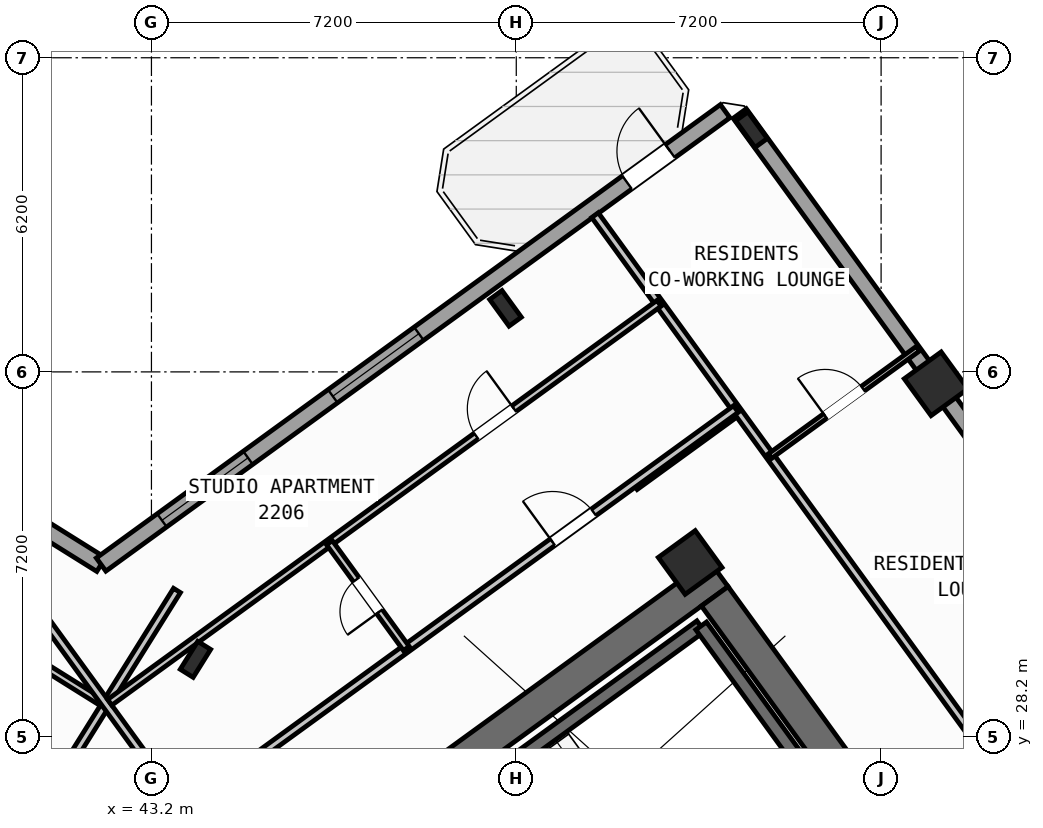
"""IFC4 building model, lengths in metres.
Left out: names, types, materials, properties, quantities, classifications, styles, units other than length and angle.
Written with IfcOpenShell. Run it as: python <this file> out.ifc"""

import sys

from ifc_helpers import new_model, si_unit, direction, frame, frame_2d, origin, origin_2d, place, context, subcontext, project, spatial, rectangle, hollow_rectangle, i_section, extrude, source, transform, mapped, element, fill, save


model = new_model("IFC4")
c1 = context("Model", 3, precision=1e-05, world=origin(), true_north=direction((0.0, 1.0)))
c2 = subcontext(c1, "Body", "Model", "MODEL_VIEW")
j1 = project(units=[si_unit("LENGTHUNIT", "METRE"), si_unit("PLANEANGLEUNIT", "RADIAN")], contexts=[c1])
p1 = place(None, origin())
s1 = spatial("IfcSite", under=j1, at=p1, CompositionType="ELEMENT")
p2 = place(p1, origin())
s2 = spatial("IfcBuilding", under=s1, at=p2, CompositionType="ELEMENT")
p3 = place(p2, frame((0.0, 0.0, 90.0)))
s3 = spatial("IfcBuildingStorey", under=s2, at=p3, CompositionType="ELEMENT", Elevation=90.0)
p4 = place(p3, frame((44.325, 24.113, 0.0), z_axis=(0.0, 0.0, 1.0), x_axis=(0.809012664862, 0.58779121131, 0.0)))
e1 = element("IfcWall", 1, at=p4, inside=s3, PredefinedType="SHEAR", context=c2, shape_type="SweptSolid", body=[
    extrude(rectangle(XDim=12.44, YDim=0.65, at=frame_2d((6.22, 0.0))), origin(), (0.0, 0.0, 1.0), 3.35),
])
p5 = place(p3, frame((58.064, 25.813, 0.0), z_axis=(0.0, 0.0, 1.0), x_axis=(-0.58777996584, 0.809020835181, 0.0)))
e2 = element("IfcWall", 2, at=p5, inside=s3, PredefinedType="SHEAR", context=c2, shape_type="SweptSolid", body=[
    extrude(rectangle(XDim=6.375, YDim=0.65, at=frame_2d((3.188, 0.0))), origin(), (0.0, 0.0, 1.0), 3.35),
])
m1 = source(origin(), c2, "Body", "SweptSolid", [
    extrude(i_section(OverallWidth=0.3, OverallDepth=0.65, WebThickness=0.016, FlangeThickness=0.031, at=origin_2d()), origin(), (0.0, 0.0, 1.0), 3.6),
])
p6 = place(p3, frame((44.068, 29.726, 0.0), z_axis=(0.0, 0.0, 1.0), x_axis=(-0.848048096156, 0.529919264233, 0.0)))
e3 = element("IfcColumn", 3, at=p6, inside=s3, PredefinedType="COLUMN", context=c2, shape_type="MappedRepresentation", body=[
    mapped(m1, transform((0.0, 0.0, 0.0), scale=1.0)),
])
m2 = source(origin(), c2, "Body", "SweptSolid", [
    extrude(hollow_rectangle(XDim=0.9, YDim=0.9, WallThickness=0.036, at=origin_2d()), origin(), (0.0, 0.0, 1.0), 3.6),
])
p7 = place(p3, frame((53.832, 31.638, 0.0), z_axis=(0.0, 0.0, 1.0), x_axis=(0.809016994375, 0.587785252292, 0.0)))
e4 = element("IfcColumn", 4, at=p7, inside=s3, PredefinedType="COLUMN", context=c2, shape_type="MappedRepresentation", body=[
    mapped(m2, transform((0.0, 0.0, 0.0), scale=1.0)),
])
p8 = place(p3, frame((50.188, 36.654, 0.0), z_axis=(0.0, 0.0, 1.0), x_axis=(0.809016994375, 0.587785252292, 0.0)))
e5 = element("IfcColumn", 5, at=p8, inside=s3, PredefinedType="COLUMN", context=c2, shape_type="MappedRepresentation", body=[
    mapped(m1, transform((0.0, 0.0, 0.0), scale=1.0)),
])
p9 = place(p3, frame((58.686, 35.165, 0.0), z_axis=(0.0, 0.0, 1.0), x_axis=(0.809016994375, 0.587785252292, 0.0)))
e6 = element("IfcColumn", 6, at=p9, inside=s3, PredefinedType="COLUMN", context=c2, shape_type="MappedRepresentation", body=[
    mapped(m2, transform((0.0, 0.0, 0.0), scale=1.0)),
])
p10 = place(p3, frame((55.042, 40.181, 0.0), z_axis=(0.0, 0.0, 1.0), x_axis=(0.809016994375, 0.587785252292, 0.0)))
e7 = element("IfcColumn", 7, at=p10, inside=s3, PredefinedType="COLUMN", context=c2, shape_type="MappedRepresentation", body=[
    mapped(m1, transform((0.0, 0.0, 0.0), scale=1.0)),
])
p11 = place(p3, frame((17.424, 47.083, 0.0), z_axis=(0.0, 0.0, 1.0), x_axis=(0.848049927979, -0.529916332693, 0.0)))
e8 = element("IfcWall", 8, at=p11, inside=s3, PredefinedType="STANDARD", context=c2, shape_type="SweptSolid", body=[
    extrude(rectangle(XDim=29.223, YDim=0.32, at=frame_2d((14.612, 0.0))), origin(), (0.0, 0.0, 1.0), 3.35),
])
p12 = place(p11, frame((15.02, 0.0, 0.0)))
e9 = element("IfcOpeningElement", 9, at=p12, cuts=e8, PredefinedType="OPENING", context=c2, shape_type="SweptSolid", body=[
    extrude(rectangle(XDim=1.05, YDim=2.15, at=frame_2d((0.525, 1.075))), frame((0.0, 0.17, 0.0), z_axis=(0.0, -1.0, 0.0), x_axis=(1.0, 0.0, 0.0)), (0.0, 0.0, 1.0), 0.34),
])
p13 = place(p11, frame((20.869, 0.0, 0.8)))
e10 = element("IfcOpeningElement", 10, at=p13, cuts=e8, PredefinedType="OPENING", context=c2, shape_type="SweptSolid", body=[
    extrude(rectangle(XDim=2.1, YDim=1.55, at=frame_2d((1.05, 0.775))), frame((0.0, 0.17, 0.0), z_axis=(0.0, -1.0, 0.0), x_axis=(1.0, 0.0, 0.0)), (0.0, 0.0, 1.0), 0.34),
])
p14 = place(p11, frame((25.438, 0.0, 0.8)))
e11 = element("IfcOpeningElement", 11, at=p14, cuts=e8, PredefinedType="OPENING", context=c2, shape_type="SweptSolid", body=[
    extrude(rectangle(XDim=2.1, YDim=1.55, at=frame_2d((1.05, 0.775))), frame((0.0, 0.17, 0.0), z_axis=(0.0, -1.0, 0.0), x_axis=(1.0, 0.0, 0.0)), (0.0, 0.0, 1.0), 0.34),
])
p15 = place(p11, frame((10.481, 0.0, 1.0)))
e12 = element("IfcOpeningElement", 12, at=p15, cuts=e8, PredefinedType="OPENING", context=c2, shape_type="SweptSolid", body=[
    extrude(rectangle(XDim=0.9, YDim=1.25, at=frame_2d((0.45, 0.625))), frame((0.0, 0.17, 0.0), z_axis=(0.0, -1.0, 0.0), x_axis=(1.0, 0.0, 0.0)), (0.0, 0.0, 1.0), 0.34),
])
p16 = place(p11, frame((6.674, 0.0, 1.0)))
e13 = element("IfcOpeningElement", 13, at=p16, cuts=e8, PredefinedType="OPENING", context=c2, shape_type="SweptSolid", body=[
    extrude(rectangle(XDim=0.9, YDim=1.25, at=frame_2d((0.45, 0.625))), frame((0.0, 0.17, 0.0), z_axis=(0.0, -1.0, 0.0), x_axis=(1.0, 0.0, 0.0)), (0.0, 0.0, 1.0), 0.34),
])
p17 = place(p11, frame((3.694, 0.0, 1.0)))
e14 = element("IfcOpeningElement", 14, at=p17, cuts=e8, PredefinedType="OPENING", context=c2, shape_type="SweptSolid", body=[
    extrude(rectangle(XDim=0.9, YDim=1.25, at=frame_2d((0.45, 0.625))), frame((0.0, 0.17, 0.0), z_axis=(0.0, -1.0, 0.0), x_axis=(1.0, 0.0, 0.0)), (0.0, 0.0, 1.0), 0.34),
])
p18 = place(p3, frame((42.207, 31.597, 0.0), z_axis=(0.0, 0.0, 1.0), x_axis=(0.809020333377, 0.587780656523, 0.0)))
e15 = element("IfcWall", 15, at=p18, inside=s3, PredefinedType="STANDARD", context=c2, shape_type="SweptSolid", body=[
    extrude(rectangle(XDim=15.223, YDim=0.32, at=frame_2d((7.611, 0.0))), origin(), (0.0, 0.0, 1.0), 3.35),
])
p19 = place(p18, frame((12.831, 0.0, 0.0)))
e16 = element("IfcOpeningElement", 16, at=p19, cuts=e15, PredefinedType="OPENING", context=c2, shape_type="SweptSolid", body=[
    extrude(rectangle(XDim=1.05, YDim=2.15, at=frame_2d((0.525, 1.075))), frame((0.0, 0.17, 0.0), z_axis=(0.0, -1.0, 0.0), x_axis=(1.0, 0.0, 0.0)), (0.0, 0.0, 1.0), 0.34),
])
p20 = place(p18, frame((1.484, 0.0, 0.8)))
e17 = element("IfcOpeningElement", 17, at=p20, cuts=e15, PredefinedType="OPENING", context=c2, shape_type="SweptSolid", body=[
    extrude(rectangle(XDim=2.1, YDim=1.55, at=frame_2d((1.05, 0.775))), frame((0.0, 0.17, 0.0), z_axis=(0.0, -1.0, 0.0), x_axis=(1.0, 0.0, 0.0)), (0.0, 0.0, 1.0), 0.34),
])
p21 = place(p18, frame((5.652, 0.0, 0.8)))
e18 = element("IfcOpeningElement", 18, at=p21, cuts=e15, PredefinedType="OPENING", context=c2, shape_type="SweptSolid", body=[
    extrude(rectangle(XDim=2.1, YDim=1.55, at=frame_2d((1.05, 0.775))), frame((0.0, 0.17, 0.0), z_axis=(0.0, -1.0, 0.0), x_axis=(1.0, 0.0, 0.0)), (0.0, 0.0, 1.0), 0.34),
])
p22 = place(p3, frame((54.81, 40.5, 0.0), z_axis=(0.0, 0.0, 1.0), x_axis=(0.587783625747, -0.809018176127, 0.0)))
e19 = element("IfcWall", 19, at=p22, inside=s3, PredefinedType="STANDARD", context=c2, shape_type="SweptSolid", body=[
    extrude(rectangle(XDim=21.587, YDim=0.32, at=frame_2d((10.794, 0.0))), origin(), (0.0, 0.0, 1.0), 2.775),
])
p23 = place(p22, frame((9.194, 0.0, 0.8)))
e20 = element("IfcOpeningElement", 20, at=p23, cuts=e19, PredefinedType="OPENING", context=c2, shape_type="SweptSolid", body=[
    extrude(rectangle(XDim=2.1, YDim=1.55, at=frame_2d((1.05, 0.775))), frame((0.0, 0.17, 0.0), z_axis=(0.0, -1.0, 0.0), x_axis=(1.0, 0.0, 0.0)), (0.0, 0.0, 1.0), 0.34),
])
p24 = place(p22, frame((18.159, 0.0, 0.85)))
e21 = element("IfcOpeningElement", 21, at=p24, cuts=e19, PredefinedType="OPENING", context=c2, shape_type="SweptSolid", body=[
    extrude(rectangle(XDim=1.8, YDim=1.5, at=frame_2d((0.9, 0.75))), frame((0.0, 0.17, 0.0), z_axis=(0.0, -1.0, 0.0), x_axis=(1.0, 0.0, 0.0)), (0.0, 0.0, 1.0), 0.34),
])
p25 = place(p3, frame((48.006, 25.996, 0.0), z_axis=(0.0, 0.0, 1.0), x_axis=(0.80901903764, 0.587782439969, 0.0)))
e22 = element("IfcWall", 22, at=p25, inside=s3, PredefinedType="SHEAR", context=c2, shape_type="SweptSolid", body=[
    extrude(rectangle(XDim=7.46, YDim=0.26, at=frame_2d((3.73, 0.0))), origin(), (0.0, 0.0, 1.0), 3.35),
])
p26 = place(p3, frame((55.906, 27.831, 0.0), z_axis=(0.0, 0.0, 1.0), x_axis=(-0.587804123638, 0.809003283204, 0.0)))
e23 = element("IfcWall", 23, at=p26, inside=s3, PredefinedType="SHEAR", context=c2, shape_type="SweptSolid", body=[
    extrude(rectangle(XDim=3.16, YDim=0.26, at=frame_2d((1.58, 0.0))), origin(), (0.0, 0.0, 1.0), 3.35),
])
p27 = place(p3, frame((41.936, 26.012, 0.0), z_axis=(0.0, 0.0, 1.0), x_axis=(-0.848051154596, 0.529914369676, 0.0)))
e24 = element("IfcWall", 24, at=p27, inside=s3, PredefinedType="PARTITIONING", context=c2, shape_type="SweptSolid", body=[
    extrude(rectangle(XDim=15.57, YDim=0.16, at=frame_2d((7.785, 0.0))), origin(), (0.0, 0.0, 1.0), 3.34),
])
p28 = place(p27, frame((10.83, 0.0, 0.0)))
e25 = element("IfcOpeningElement", 25, at=p28, cuts=e24, PredefinedType="OPENING", context=c2, shape_type="SweptSolid", body=[
    extrude(rectangle(XDim=1.0, YDim=2.1, at=frame_2d((0.5, 1.05))), frame((0.0, 0.09, 0.0), z_axis=(0.0, -1.0, 0.0), x_axis=(1.0, 0.0, 0.0)), (0.0, 0.0, 1.0), 0.18),
])
p29 = place(p3, frame((43.704, 31.086, 0.0), z_axis=(0.0, 0.0, 1.0), x_axis=(-0.529906828443, -0.848055866774, 0.0)))
e26 = element("IfcWall", 26, at=p29, inside=s3, PredefinedType="PARTITIONING", context=c2, shape_type="SweptSolid", body=[
    extrude(rectangle(XDim=5.48, YDim=0.16, at=frame_2d((2.74, 0.0))), origin(), (0.0, 0.0, 1.0), 3.34),
])
p30 = place(p3, frame((42.226, 28.873, 0.0), z_axis=(0.0, 0.0, 1.0), x_axis=(-0.848049134363, 0.529917602752, 0.0)))
e27 = element("IfcWall", 27, at=p30, inside=s3, PredefinedType="PLUMBINGWALL", context=c2, shape_type="SweptSolid", body=[
    extrude(rectangle(XDim=14.3, YDim=0.14, at=frame_2d((7.15, 0.0))), origin(), (0.0, 0.0, 1.0), 3.34),
])
p31 = place(p30, frame((9.57, 0.0, 0.0)))
e28 = element("IfcOpeningElement", 28, at=p31, cuts=e27, PredefinedType="OPENING", context=c2, shape_type="SweptSolid", body=[
    extrude(rectangle(XDim=0.92, YDim=2.08, at=frame_2d((0.46, 1.04))), frame((0.0, 0.08, 0.0), z_axis=(0.0, -1.0, 0.0), x_axis=(1.0, 0.0, 0.0)), (0.0, 0.0, 1.0), 0.16),
])
p32 = place(p3, frame((52.739, 33.143, 0.0), z_axis=(0.0, 0.0, 1.0), x_axis=(0.809000999347, 0.58780726693, 0.0)))
e29 = element("IfcWall", 29, at=p32, inside=s3, PredefinedType="PARTITIONING", context=c2, shape_type="SweptSolid", body=[
    extrude(rectangle(XDim=2.51, YDim=0.16, at=frame_2d((1.255, 0.0))), origin(), (0.0, 0.0, 1.0), 3.34),
])
p33 = place(p3, frame((60.829, 26.278, 0.0), z_axis=(0.0, 0.0, 1.0), x_axis=(-0.587777474174, 0.809022645451, 0.0)))
e30 = element("IfcWall", 30, at=p33, inside=s3, PredefinedType="PARTITIONING", context=c2, shape_type="SweptSolid", body=[
    extrude(rectangle(XDim=15.1, YDim=0.16, at=frame_2d((7.55, 0.0))), origin(), (0.0, 0.0, 1.0), 3.34),
])
p34 = place(p3, frame((55.409, 33.738, 0.0), z_axis=(0.0, 0.0, 1.0), x_axis=(0.809005039917, 0.58780170584, 0.0)))
e31 = element("IfcWall", 31, at=p34, inside=s3, PredefinedType="PARTITIONING", context=c2, shape_type="SweptSolid", body=[
    extrude(rectangle(XDim=3.61, YDim=0.11, at=frame_2d((1.805, 0.0))), origin(), (0.0, 0.0, 1.0), 3.34),
])
p35 = place(p34, frame((1.345, 0.0, 0.0)))
e32 = element("IfcOpeningElement", 32, at=p35, cuts=e31, PredefinedType="OPENING", context=c2, shape_type="SweptSolid", body=[
    extrude(rectangle(XDim=0.92, YDim=2.08, at=frame_2d((0.46, 1.04))), frame((0.0, 0.065, 0.0), z_axis=(0.0, -1.0, 0.0), x_axis=(1.0, 0.0, 0.0)), (0.0, 0.0, 1.0), 0.13),
])
p36 = place(p3, frame((42.866, 26.044, 0.0), z_axis=(0.0, 0.0, 1.0), x_axis=(0.809020254154, 0.587780765566, 0.0)))
e33 = element("IfcWall", 33, at=p36, inside=s3, PredefinedType="PARTITIONING", context=c2, shape_type="SweptSolid", body=[
    extrude(rectangle(XDim=14.67, YDim=0.16, at=frame_2d((7.335, 0.0))), origin(), (0.0, 0.0, 1.0), 3.34),
])
p37 = place(p36, frame((10.2, 0.0, 0.0)))
e34 = element("IfcOpeningElement", 34, at=p37, cuts=e33, PredefinedType="OPENING", context=c2, shape_type="SweptSolid", body=[
    extrude(rectangle(XDim=1.0, YDim=2.1, at=frame_2d((0.5, 1.05))), frame((0.0, 0.09, 0.0), z_axis=(0.0, -1.0, 0.0), x_axis=(1.0, 0.0, 0.0)), (0.0, 0.0, 1.0), 0.18),
])
p38 = place(p3, frame((43.969, 26.55, 0.0), z_axis=(0.0, 0.0, 1.0), x_axis=(-0.587776919386, 0.80902304852, 0.0)))
e35 = element("IfcWall", 35, at=p38, inside=s3, PredefinedType="PARTITIONING", context=c2, shape_type="SweptSolid", body=[
    extrude(rectangle(XDim=5.48, YDim=0.16, at=frame_2d((2.74, 0.0))), origin(), (0.0, 0.0, 1.0), 3.34),
])
p39 = place(p3, frame((42.377, 28.878, 0.0), z_axis=(0.0, 0.0, 1.0), x_axis=(0.809020411523, 0.587780548963, 0.0)))
e36 = element("IfcWall", 36, at=p39, inside=s3, PredefinedType="PLUMBINGWALL", context=c2, shape_type="SweptSolid", body=[
    extrude(rectangle(XDim=13.4, YDim=0.14, at=frame_2d((6.7, 0.0))), origin(), (0.0, 0.0, 1.0), 3.34),
])
p40 = place(p39, frame((8.94, 0.0, 0.0)))
e37 = element("IfcOpeningElement", 37, at=p40, cuts=e36, PredefinedType="OPENING", context=c2, shape_type="SweptSolid", body=[
    extrude(rectangle(XDim=0.92, YDim=2.08, at=frame_2d((0.46, 1.04))), frame((0.0, 0.08, 0.0), z_axis=(0.0, -1.0, 0.0), x_axis=(1.0, 0.0, 0.0)), (0.0, 0.0, 1.0), 0.16),
])
p41 = place(p3, frame((48.229, 29.941, 0.0), z_axis=(0.0, 0.0, 1.0), x_axis=(-0.587772116736, 0.809026537752, 0.0)))
e38 = element("IfcWall", 38, at=p41, inside=s3, PredefinedType="PLUMBINGWALL", context=c2, shape_type="SweptSolid", body=[
    extrude(rectangle(XDim=2.58, YDim=0.14, at=frame_2d((1.29, 0.0))), origin(), (0.0, 0.0, 1.0), 3.34),
])
p42 = place(p41, frame((0.9, 0.0, 0.0)))
e39 = element("IfcOpeningElement", 39, at=p42, cuts=e38, PredefinedType="OPENING", context=c2, shape_type="SweptSolid", body=[
    extrude(rectangle(XDim=0.78, YDim=2.05, at=frame_2d((0.39, 1.025))), frame((0.0, 0.08, 0.0), z_axis=(0.0, -1.0, 0.0), x_axis=(1.0, 0.0, 0.0)), (0.0, 0.0, 1.0), 0.16),
])
m3 = source(origin(), c2, "Body", "SweptSolid", [
    extrude(rectangle(XDim=1.05, YDim=2.15, at=frame_2d((0.525, 1.075))), frame((0.0, 0.025, 0.0), z_axis=(0.0, -1.0, 0.0), x_axis=(1.0, 0.0, 0.0)), (0.0, 0.0, 1.0), 0.05),
])
p43 = place(p19, origin())
e40 = element("IfcDoor", 40, at=p43, inside=s3, OperationType="SINGLE_SWING_RIGHT", PredefinedType="DOOR", context=c2, shape_type="MappedRepresentation", body=[
    mapped(m3, transform((0.0, 0.0, 0.0), scale=1.0)),
])
fill(e16, e40)
m4 = source(origin(), c2, "Body", "SweptSolid", [
    extrude(rectangle(XDim=2.1, YDim=1.55, at=frame_2d((1.05, 0.775))), frame((0.0, 0.03, 0.0), z_axis=(0.0, -1.0, 0.0), x_axis=(1.0, 0.0, 0.0)), (0.0, 0.0, 1.0), 0.06),
])
p44 = place(p20, origin())
e41 = element("IfcWindow", 41, at=p44, inside=s3, PartitioningType="SINGLE_PANEL", PredefinedType="WINDOW", context=c2, shape_type="MappedRepresentation", body=[
    mapped(m4, transform((0.0, 0.0, 0.0), scale=1.0)),
])
fill(e17, e41)
p45 = place(p21, origin())
e42 = element("IfcWindow", 42, at=p45, inside=s3, PartitioningType="SINGLE_PANEL", PredefinedType="WINDOW", context=c2, shape_type="MappedRepresentation", body=[
    mapped(m4, transform((0.0, 0.0, 0.0), scale=1.0)),
])
fill(e18, e42)
m5 = source(origin(), c2, "Body", "SweptSolid", [
    extrude(rectangle(XDim=0.92, YDim=2.08, at=frame_2d((0.46, 1.04))), frame((0.0, 0.025, 0.0), z_axis=(0.0, -1.0, 0.0), x_axis=(1.0, 0.0, 0.0)), (0.0, 0.0, 1.0), 0.05),
])
p46 = place(p35, origin())
e43 = element("IfcDoor", 43, at=p46, inside=s3, OperationType="SINGLE_SWING_LEFT", PredefinedType="DOOR", context=c2, shape_type="MappedRepresentation", body=[
    mapped(m5, transform((0.0, 0.0, 0.0), scale=1.0)),
])
fill(e32, e43)
m6 = source(origin(), c2, "Body", "SweptSolid", [
    extrude(rectangle(XDim=1.0, YDim=2.1, at=frame_2d((0.5, 1.05))), frame((0.0, 0.025, 0.0), z_axis=(0.0, -1.0, 0.0), x_axis=(1.0, 0.0, 0.0)), (0.0, 0.0, 1.0), 0.05),
])
p47 = place(p37, origin())
e44 = element("IfcDoor", 44, at=p47, inside=s3, OperationType="SINGLE_SWING_LEFT", PredefinedType="DOOR", context=c2, shape_type="MappedRepresentation", body=[
    mapped(m6, transform((0.0, 0.0, 0.0), scale=1.0)),
])
fill(e34, e44)
p48 = place(p40, origin())
e45 = element("IfcDoor", 45, at=p48, inside=s3, OperationType="SINGLE_SWING_RIGHT", PredefinedType="DOOR", context=c2, shape_type="MappedRepresentation", body=[
    mapped(m5, transform((0.0, 0.0, 0.0), scale=1.0)),
])
fill(e37, e45)
m7 = source(origin(), c2, "Body", "SweptSolid", [
    extrude(rectangle(XDim=0.78, YDim=2.05, at=frame_2d((0.39, 1.025))), frame((0.0, 0.025, 0.0), z_axis=(0.0, -1.0, 0.0), x_axis=(1.0, 0.0, 0.0)), (0.0, 0.0, 1.0), 0.05),
])
p49 = place(p42, origin())
e46 = element("IfcDoor", 46, at=p49, inside=s3, OperationType="SINGLE_SWING_LEFT", PredefinedType="DOOR", context=c2, shape_type="MappedRepresentation", body=[
    mapped(m7, transform((0.0, 0.0, 0.0), scale=1.0)),
])
fill(e39, e46)
save(model, sys.argv[1])
